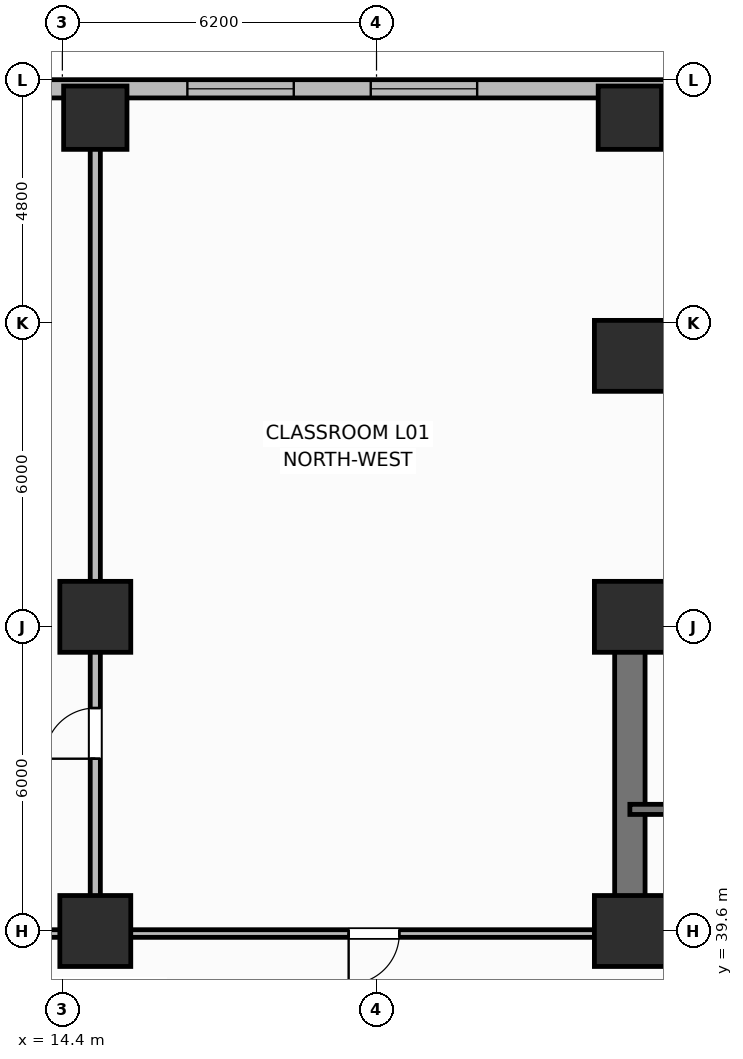
"""IFC4 building model, lengths in metres.
Left out: names, types, materials, properties, quantities, classifications, styles, units other than length and angle.
Written with IfcOpenShell. Run it as: python <this file> out.ifc"""

import sys

from ifc_helpers import new_model, si_unit, direction, frame, frame_2d, origin, origin_2d, place, context, subcontext, project, spatial, rectangle, extrude, element, fill, save


model = new_model("IFC4")
c1 = context("Model", 3, precision=1e-05, world=origin(), true_north=direction((0.0, 1.0)))
c2 = subcontext(c1, "Body", "Model", "MODEL_VIEW")
j1 = project(units=[si_unit("LENGTHUNIT", "METRE"), si_unit("PLANEANGLEUNIT", "RADIAN")], contexts=[c1])
p1 = place(None, origin())
s1 = spatial("IfcSite", under=j1, at=p1, CompositionType="ELEMENT")
p2 = place(p1, origin())
s2 = spatial("IfcBuilding", under=s1, at=p2, CompositionType="ELEMENT")
p3 = place(p2, frame((0.0, 0.0, 6.6)))
s3 = spatial("IfcBuildingStorey", under=s2, at=p3, CompositionType="ELEMENT", Elevation=6.6)
p4 = place(p3, frame((25.6, 45.8, 0.0), z_axis=(0.0, 0.0, 1.0), x_axis=(1.0, 0.0, 0.0)))
e1 = element("IfcWall", 1, at=p4, inside=s3, PredefinedType="SHEAR", context=c2, shape_type="SweptSolid", body=[
    extrude(rectangle(XDim=27.2, YDim=0.6, at=frame_2d((13.6, 0.0))), origin(), (0.0, 0.0, 1.0), 4.5),
])
p5 = place(p3, frame((25.6, 39.9, 0.0), z_axis=(0.0, 0.0, 1.0), x_axis=(0.0, 1.0, 0.0)))
e2 = element("IfcWall", 2, at=p5, inside=s3, PredefinedType="SHEAR", context=c2, shape_type="SweptSolid", body=[
    extrude(rectangle(XDim=5.6, YDim=0.6, at=frame_2d((2.8, 0.0))), origin(), (0.0, 0.0, 1.0), 4.5),
])
p6 = place(p3, frame((52.8, 39.6, 0.0), z_axis=(0.0, 0.0, 1.0), x_axis=(-1.0, 0.0, 0.0)))
e3 = element("IfcWall", 3, at=p6, inside=s3, PredefinedType="SHEAR", context=c2, shape_type="SweptSolid", body=[
    extrude(rectangle(XDim=27.2, YDim=0.6, at=frame_2d((13.6, 0.0))), origin(), (0.0, 0.0, 1.0), 4.5),
])
p7 = place(p6, frame((24.2, 0.0, 0.0)))
e4 = element("IfcOpeningElement", 4, at=p7, cuts=e3, PredefinedType="OPENING", context=c2, shape_type="SweptSolid", body=[
    extrude(rectangle(XDim=1.1, YDim=2.15, at=frame_2d((0.55, 1.075))), frame((0.0, 0.31, 0.0), z_axis=(0.0, -1.0, 0.0), x_axis=(1.0, 0.0, 0.0)), (0.0, 0.0, 1.0), 0.62),
])
p8 = place(p6, frame((20.55, 0.0, 0.0)))
e5 = element("IfcOpeningElement", 5, at=p8, cuts=e3, PredefinedType="OPENING", context=c2, shape_type="SweptSolid", body=[
    extrude(rectangle(XDim=0.95, YDim=2.1, at=frame_2d((0.475, 1.05))), frame((0.0, 0.31, 0.0), z_axis=(0.0, -1.0, 0.0), x_axis=(1.0, 0.0, 0.0)), (0.0, 0.0, 1.0), 0.62),
])
p9 = place(p6, frame((15.1, 0.0, 0.0)))
e6 = element("IfcOpeningElement", 6, at=p9, cuts=e3, PredefinedType="OPENING", context=c2, shape_type="SweptSolid", body=[
    extrude(rectangle(XDim=1.2, YDim=2.15, at=frame_2d((0.6, 1.075))), frame((0.0, 0.31, 0.0), z_axis=(0.0, -1.0, 0.0), x_axis=(1.0, 0.0, 0.0)), (0.0, 0.0, 1.0), 0.62),
])
p10 = place(p6, frame((11.6, 0.0, 0.0)))
e7 = element("IfcOpeningElement", 7, at=p10, cuts=e3, PredefinedType="OPENING", context=c2, shape_type="SweptSolid", body=[
    extrude(rectangle(XDim=0.9, YDim=2.1, at=frame_2d((0.45, 1.05))), frame((0.0, 0.31, 0.0), z_axis=(0.0, -1.0, 0.0), x_axis=(1.0, 0.0, 0.0)), (0.0, 0.0, 1.0), 0.62),
])
p11 = place(p6, frame((4.8, 0.0, 0.0)))
e8 = element("IfcOpeningElement", 8, at=p11, cuts=e3, PredefinedType="OPENING", context=c2, shape_type="SweptSolid", body=[
    extrude(rectangle(XDim=0.85, YDim=2.1, at=frame_2d((0.425, 1.05))), frame((0.0, 0.31, 0.0), z_axis=(0.0, -1.0, 0.0), x_axis=(1.0, 0.0, 0.0)), (0.0, 0.0, 1.0), 0.62),
])
p12 = place(p6, frame((1.9, 0.0, 0.0)))
e9 = element("IfcOpeningElement", 9, at=p12, cuts=e3, PredefinedType="OPENING", context=c2, shape_type="SweptSolid", body=[
    extrude(rectangle(XDim=0.85, YDim=2.1, at=frame_2d((0.425, 1.05))), frame((0.0, 0.31, 0.0), z_axis=(0.0, -1.0, 0.0), x_axis=(1.0, 0.0, 0.0)), (0.0, 0.0, 1.0), 0.62),
])
for number, where, z_axis, x_axis in (
    (10, (25.6, 39.6, 0.0), (0.0, 0.0, 1.0), (1.0, 0.0, 0.0)),
    (11, (25.6, 45.8, 0.0), (0.0, 0.0, 1.0), (1.0, 0.0, 0.0)),
):
    element("IfcColumn", number, at=place(p3, frame(where, z_axis=z_axis, x_axis=x_axis)), inside=s3, PredefinedType="COLUMN", context=c2, shape_type="SweptSolid", body=[
        extrude(rectangle(XDim=1.4, YDim=1.4, at=origin_2d()), origin(), (0.0, 0.0, 1.0), 4.5),
    ])
for number, where, z_axis, x_axis in (
    (12, (15.05, 55.65, 0.0), (0.0, 0.0, 1.0), (1.0, 0.0, 0.0)),
    (13, (25.6, 55.65, 0.0), (0.0, 0.0, 1.0), (1.0, 0.0, 0.0)),
):
    element("IfcColumn", number, at=place(p3, frame(where, z_axis=z_axis, x_axis=x_axis)), inside=s3, PredefinedType="COLUMN", context=c2, shape_type="SweptSolid", body=[
        extrude(rectangle(XDim=1.25, YDim=1.25, at=origin_2d()), origin(), (0.0, 0.0, 1.0), 4.5),
    ])
for number, where, z_axis, x_axis in (
    (14, (25.6, 50.95, 0.0), (0.0, 0.0, 1.0), (1.0, 0.0, 0.0)),
    (15, (15.05, 39.6, 0.0), (0.0, 0.0, 1.0), (1.0, 0.0, 0.0)),
    (16, (15.05, 45.8, 0.0), (0.0, 0.0, 1.0), (1.0, 0.0, 0.0)),
):
    element("IfcColumn", number, at=place(p3, frame(where, z_axis=z_axis, x_axis=x_axis)), inside=s3, PredefinedType="COLUMN", context=c2, shape_type="SweptSolid", body=[
        extrude(rectangle(XDim=1.4, YDim=1.4, at=origin_2d()), origin(), (0.0, 0.0, 1.0), 4.5),
    ])
p13 = place(p3, frame((56.57, 56.22, 0.0), z_axis=(0.0, 0.0, 1.0), x_axis=(-1.0, 0.0, 0.0)))
e17 = element("IfcWall", 17, at=p13, inside=s3, PredefinedType="SOLIDWALL", context=c2, shape_type="SweptSolid", body=[
    extrude(rectangle(XDim=55.59, YDim=0.36, at=frame_2d((27.795, 0.0))), origin(), (0.0, 0.0, 1.0), 3.48),
])
p14 = place(p13, frame((5.029, 0.0, 0.85)))
e18 = element("IfcOpeningElement", 18, at=p14, cuts=e17, PredefinedType="OPENING", context=c2, shape_type="SweptSolid", body=[
    extrude(rectangle(XDim=2.1, YDim=2.2, at=frame_2d((1.05, 1.1))), frame((0.0, 0.19, 0.0), z_axis=(0.0, -1.0, 0.0), x_axis=(1.0, 0.0, 0.0)), (0.0, 0.0, 1.0), 0.38),
])
p15 = place(p13, frame((8.648, 0.0, 0.85)))
e19 = element("IfcOpeningElement", 19, at=p15, cuts=e17, PredefinedType="OPENING", context=c2, shape_type="SweptSolid", body=[
    extrude(rectangle(XDim=2.1, YDim=2.2, at=frame_2d((1.05, 1.1))), frame((0.0, 0.19, 0.0), z_axis=(0.0, -1.0, 0.0), x_axis=(1.0, 0.0, 0.0)), (0.0, 0.0, 1.0), 0.38),
])
p16 = place(p13, frame((12.268, 0.0, 0.85)))
e20 = element("IfcOpeningElement", 20, at=p16, cuts=e17, PredefinedType="OPENING", context=c2, shape_type="SweptSolid", body=[
    extrude(rectangle(XDim=2.1, YDim=2.2, at=frame_2d((1.05, 1.1))), frame((0.0, 0.19, 0.0), z_axis=(0.0, -1.0, 0.0), x_axis=(1.0, 0.0, 0.0)), (0.0, 0.0, 1.0), 0.38),
])
p17 = place(p13, frame((19.506, 0.0, 0.85)))
e21 = element("IfcOpeningElement", 21, at=p17, cuts=e17, PredefinedType="OPENING", context=c2, shape_type="SweptSolid", body=[
    extrude(rectangle(XDim=2.1, YDim=2.2, at=frame_2d((1.05, 1.1))), frame((0.0, 0.19, 0.0), z_axis=(0.0, -1.0, 0.0), x_axis=(1.0, 0.0, 0.0)), (0.0, 0.0, 1.0), 0.38),
])
p18 = place(p13, frame((23.126, 0.0, 0.85)))
e22 = element("IfcOpeningElement", 22, at=p18, cuts=e17, PredefinedType="OPENING", context=c2, shape_type="SweptSolid", body=[
    extrude(rectangle(XDim=2.1, YDim=2.2, at=frame_2d((1.05, 1.1))), frame((0.0, 0.19, 0.0), z_axis=(0.0, -1.0, 0.0), x_axis=(1.0, 0.0, 0.0)), (0.0, 0.0, 1.0), 0.38),
])
p19 = place(p13, frame((26.745, 0.0, 0.85)))
e23 = element("IfcOpeningElement", 23, at=p19, cuts=e17, PredefinedType="OPENING", context=c2, shape_type="SweptSolid", body=[
    extrude(rectangle(XDim=2.1, YDim=2.2, at=frame_2d((1.05, 1.1))), frame((0.0, 0.19, 0.0), z_axis=(0.0, -1.0, 0.0), x_axis=(1.0, 0.0, 0.0)), (0.0, 0.0, 1.0), 0.38),
])
p20 = place(p13, frame((33.984, 0.0, 0.85)))
e24 = element("IfcOpeningElement", 24, at=p20, cuts=e17, PredefinedType="OPENING", context=c2, shape_type="SweptSolid", body=[
    extrude(rectangle(XDim=2.1, YDim=2.2, at=frame_2d((1.05, 1.1))), frame((0.0, 0.19, 0.0), z_axis=(0.0, -1.0, 0.0), x_axis=(1.0, 0.0, 0.0)), (0.0, 0.0, 1.0), 0.38),
])
p21 = place(p13, frame((37.603, 0.0, 0.85)))
e25 = element("IfcOpeningElement", 25, at=p21, cuts=e17, PredefinedType="OPENING", context=c2, shape_type="SweptSolid", body=[
    extrude(rectangle(XDim=2.1, YDim=2.2, at=frame_2d((1.05, 1.1))), frame((0.0, 0.19, 0.0), z_axis=(0.0, -1.0, 0.0), x_axis=(1.0, 0.0, 0.0)), (0.0, 0.0, 1.0), 0.38),
])
p22 = place(p13, frame((44.842, 0.0, 0.85)))
e26 = element("IfcOpeningElement", 26, at=p22, cuts=e17, PredefinedType="OPENING", context=c2, shape_type="SweptSolid", body=[
    extrude(rectangle(XDim=2.1, YDim=2.2, at=frame_2d((1.05, 1.1))), frame((0.0, 0.19, 0.0), z_axis=(0.0, -1.0, 0.0), x_axis=(1.0, 0.0, 0.0)), (0.0, 0.0, 1.0), 0.38),
])
p23 = place(p13, frame((52.08, 0.0, 0.85)))
e27 = element("IfcOpeningElement", 27, at=p23, cuts=e17, PredefinedType="OPENING", context=c2, shape_type="SweptSolid", body=[
    extrude(rectangle(XDim=2.1, YDim=2.2, at=frame_2d((1.05, 1.1))), frame((0.0, 0.19, 0.0), z_axis=(0.0, -1.0, 0.0), x_axis=(1.0, 0.0, 0.0)), (0.0, 0.0, 1.0), 0.38),
])
p24 = place(p3, frame((35.15, 42.0, 0.0), z_axis=(0.0, 0.0, 1.0), x_axis=(-1.0, 0.0, 0.0)))
e28 = element("IfcWall", 28, at=p24, inside=s3, PredefinedType="SHEAR", context=c2, shape_type="SweptSolid", body=[
    extrude(rectangle(XDim=9.55, YDim=0.2, at=frame_2d((4.775, 0.0))), origin(), (0.0, 0.0, 1.0), 4.5),
])
p25 = place(p24, frame((7.25, 0.0, 0.0)))
e29 = element("IfcOpeningElement", 29, at=p25, cuts=e28, PredefinedType="OPENING", context=c2, shape_type="SweptSolid", body=[
    extrude(rectangle(XDim=1.1, YDim=2.15, at=frame_2d((0.55, 1.075))), frame((0.0, 0.11, 0.0), z_axis=(0.0, -1.0, 0.0), x_axis=(1.0, 0.0, 0.0)), (0.0, 0.0, 1.0), 0.22),
])
p26 = place(p3, frame((15.05, 39.6, 0.0), z_axis=(0.0, 0.0, 1.0), x_axis=(0.0, 1.0, 0.0)))
e30 = element("IfcWall", 30, at=p26, inside=s3, PredefinedType="PARTITIONING", context=c2, shape_type="SweptSolid", body=[
    extrude(rectangle(XDim=16.4, YDim=0.2, at=frame_2d((8.2, 0.0))), origin(), (0.0, 0.0, 1.0), 3.42),
])
p27 = place(p26, frame((3.4, 0.0, 0.0)))
e31 = element("IfcOpeningElement", 31, at=p27, cuts=e30, PredefinedType="OPENING", context=c2, shape_type="SweptSolid", body=[
    extrude(rectangle(XDim=1.0, YDim=2.15, at=frame_2d((0.5, 1.075))), frame((0.0, 0.11, 0.0), z_axis=(0.0, -1.0, 0.0), x_axis=(1.0, 0.0, 0.0)), (0.0, 0.0, 1.0), 0.22),
])
p28 = place(p3, frame((25.25, 39.55, 0.0), z_axis=(0.0, 0.0, 1.0), x_axis=(-1.0, 0.0, 0.0)))
e32 = element("IfcWall", 32, at=p28, inside=s3, PredefinedType="PARTITIONING", context=c2, shape_type="SweptSolid", body=[
    extrude(rectangle(XDim=13.25, YDim=0.15, at=frame_2d((6.625, 0.0))), origin(), (0.0, 0.0, 1.0), 3.42),
])
p29 = place(p28, frame((4.2, 0.0, 0.0)))
e33 = element("IfcOpeningElement", 33, at=p29, cuts=e32, PredefinedType="OPENING", context=c2, shape_type="SweptSolid", body=[
    extrude(rectangle(XDim=1.0, YDim=2.15, at=frame_2d((0.5, 1.075))), frame((0.0, 0.085, 0.0), z_axis=(0.0, -1.0, 0.0), x_axis=(1.0, 0.0, 0.0)), (0.0, 0.0, 1.0), 0.17),
])
p30 = place(p20, origin())
e34 = element("IfcWindow", 34, at=p30, inside=s3, PartitioningType="SINGLE_PANEL", PredefinedType="WINDOW", context=c2, shape_type="SweptSolid", body=[
    extrude(rectangle(XDim=2.1, YDim=2.2, at=frame_2d((1.05, 1.1))), frame((0.0, 0.03, 0.0), z_axis=(0.0, -1.0, 0.0), x_axis=(1.0, 0.0, 0.0)), (0.0, 0.0, 1.0), 0.06),
])
fill(e24, e34)
p31 = place(p21, origin())
e35 = element("IfcWindow", 35, at=p31, inside=s3, PartitioningType="SINGLE_PANEL", PredefinedType="WINDOW", context=c2, shape_type="SweptSolid", body=[
    extrude(rectangle(XDim=2.1, YDim=2.2, at=frame_2d((1.05, 1.1))), frame((0.0, 0.03, 0.0), z_axis=(0.0, -1.0, 0.0), x_axis=(1.0, 0.0, 0.0)), (0.0, 0.0, 1.0), 0.06),
])
fill(e25, e35)
p32 = place(p27, origin())
e36 = element("IfcDoor", 36, at=p32, inside=s3, OperationType="SINGLE_SWING_LEFT", PredefinedType="DOOR", context=c2, shape_type="SweptSolid", body=[
    extrude(rectangle(XDim=1.0, YDim=2.15, at=frame_2d((0.5, 1.075))), frame((0.0, 0.025, 0.0), z_axis=(0.0, -1.0, 0.0), x_axis=(1.0, 0.0, 0.0)), (0.0, 0.0, 1.0), 0.05),
])
fill(e31, e36)
p33 = place(p29, origin())
e37 = element("IfcDoor", 37, at=p33, inside=s3, OperationType="SINGLE_SWING_RIGHT", PredefinedType="DOOR", context=c2, shape_type="SweptSolid", body=[
    extrude(rectangle(XDim=1.0, YDim=2.15, at=frame_2d((0.5, 1.075))), frame((0.0, 0.025, 0.0), z_axis=(0.0, -1.0, 0.0), x_axis=(1.0, 0.0, 0.0)), (0.0, 0.0, 1.0), 0.05),
])
fill(e33, e37)
save(model, sys.argv[1])
